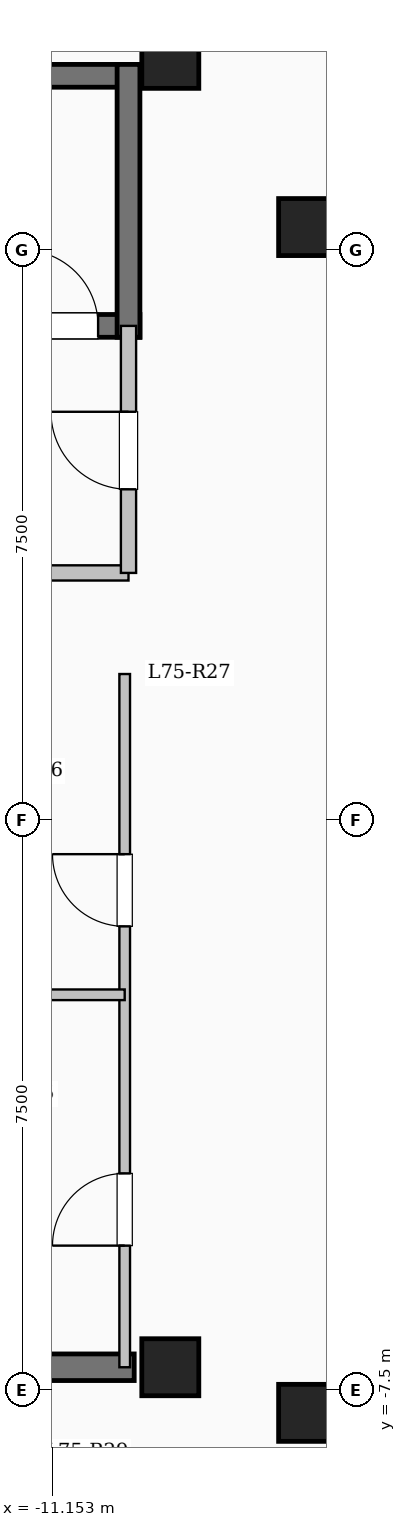
"""IFC4 building model, lengths in metres.
Left out: names, types, materials, properties, quantities, classifications, styles, units other than length and angle.
Written with IfcOpenShell. Run it as: python <this file> out.ifc"""

import sys

from ifc_helpers import new_model, si_unit, direction, frame, frame_2d, origin, origin_2d, place, context, subcontext, project, spatial, rectangle, extrude, element, fill, save


model = new_model("IFC4")
c1 = context("Model", 3, precision=1e-05, world=origin(), true_north=direction((0.0, 1.0)))
c2 = subcontext(c1, "Body", "Model", "MODEL_VIEW")
j1 = project(units=[si_unit("LENGTHUNIT", "METRE"), si_unit("PLANEANGLEUNIT", "RADIAN")], contexts=[c1])
p1 = place(None, origin())
s1 = spatial("IfcSite", under=j1, at=p1, CompositionType="ELEMENT")
p2 = place(p1, origin())
s2 = spatial("IfcBuilding", under=s1, at=p2, CompositionType="ELEMENT")
p3 = place(p2, frame((0.0, 0.0, 276.3)))
s3 = spatial("IfcBuildingStorey", under=s2, at=p3, CompositionType="ELEMENT", Elevation=276.3)
for number, where, z_axis, x_axis in (
    (1, (-7.8, -7.8, 0.0), (0.0, 0.0, 1.0), (1.0, 0.0, 0.0)),
    (2, (-7.8, 7.8, 0.0), (0.0, 0.0, 1.0), (1.0, 0.0, 0.0)),
    (3, (-9.6, -7.2, 0.0), (0.0, 0.0, 1.0), (1.0, 0.0, 0.0)),
    (4, (-9.6, 10.0, 0.0), (0.0, 0.0, 1.0), (1.0, 0.0, 0.0)),
):
    element("IfcColumn", number, at=place(p3, frame(where, z_axis=z_axis, x_axis=x_axis)), inside=s3, PredefinedType="COLUMN", context=c2, shape_type="SweptSolid", body=[
        extrude(rectangle(XDim=0.75, YDim=0.75, at=origin_2d()), origin(), (0.0, 0.0, 1.0), 5.25),
    ])
p4 = place(p3, frame((-18.0, 9.79, 0.0), z_axis=(0.0, 0.0, 1.0), x_axis=(1.0, 0.0, 0.0)))
e5 = element("IfcWall", 5, at=p4, inside=s3, PredefinedType="SHEAR", context=c2, shape_type="SweptSolid", body=[
    extrude(rectangle(XDim=8.0, YDim=0.3, at=frame_2d((4.0, 0.0))), origin(), (0.0, 0.0, 1.0), 5.25),
])
p5 = place(p3, frame((-18.0, 6.5, 0.0), z_axis=(0.0, 0.0, 1.0), x_axis=(1.0, 0.0, 0.0)))
e6 = element("IfcWall", 6, at=p5, inside=s3, PredefinedType="SHEAR", context=c2, shape_type="SweptSolid", body=[
    extrude(rectangle(XDim=8.0, YDim=0.3, at=frame_2d((4.0, 0.0))), origin(), (0.0, 0.0, 1.0), 5.25),
])
p6 = place(p5, frame((6.45, 0.0, 0.0)))
e7 = element("IfcOpeningElement", 7, at=p6, cuts=e6, PredefinedType="OPENING", context=c2, shape_type="SweptSolid", body=[
    extrude(rectangle(XDim=1.0, YDim=2.15, at=frame_2d((0.5, 1.075))), frame((0.0, 0.16, 0.0), z_axis=(0.0, -1.0, 0.0), x_axis=(1.0, 0.0, 0.0)), (0.0, 0.0, 1.0), 0.32),
])
p7 = place(p3, frame((-10.15, 6.35, 0.0), z_axis=(0.0, 0.0, 1.0), x_axis=(0.0, 1.0, 0.0)))
e8 = element("IfcWall", 8, at=p7, inside=s3, PredefinedType="SHEAR", context=c2, shape_type="SweptSolid", body=[
    extrude(rectangle(XDim=3.59, YDim=0.3, at=frame_2d((1.795, 0.0))), origin(), (0.0, 0.0, 1.0), 5.25),
])
p8 = place(p3, frame((-15.55, 3.25, 0.0), z_axis=(0.0, 0.0, 1.0), x_axis=(1.0, 0.0, 0.0)))
e9 = element("IfcWall", 9, at=p8, inside=s3, PredefinedType="SOLIDWALL", context=c2, shape_type="SweptSolid", body=[
    extrude(rectangle(XDim=5.4, YDim=0.2, at=frame_2d((2.7, 0.0))), origin(), (0.0, 0.0, 1.0), 4.95),
])
p9 = place(p3, frame((-10.15, 3.25, 0.0), z_axis=(0.0, 0.0, 1.0), x_axis=(0.0, 1.0, 0.0)))
e10 = element("IfcWall", 10, at=p9, inside=s3, PredefinedType="SOLIDWALL", context=c2, shape_type="SweptSolid", body=[
    extrude(rectangle(XDim=3.25, YDim=0.2, at=frame_2d((1.625, 0.0))), origin(), (0.0, 0.0, 1.0), 4.95),
])
p10 = place(p9, frame((1.1, 0.0, 0.0)))
e11 = element("IfcOpeningElement", 11, at=p10, cuts=e10, PredefinedType="OPENING", context=c2, shape_type="SweptSolid", body=[
    extrude(rectangle(XDim=1.02, YDim=2.15, at=frame_2d((0.51, 1.075))), frame((0.0, 0.11, 0.0), z_axis=(0.0, -1.0, 0.0), x_axis=(1.0, 0.0, 0.0)), (0.0, 0.0, 1.0), 0.22),
])
p11 = place(p3, frame((-18.625, -7.2, 0.0), z_axis=(0.0, 0.0, 1.0), x_axis=(1.0, 0.0, 0.0)))
e12 = element("IfcWall", 12, at=p11, inside=s3, PredefinedType="SHEAR", context=c2, shape_type="SweptSolid", body=[
    extrude(rectangle(XDim=8.55, YDim=0.35, at=frame_2d((4.275, 0.0))), origin(), (0.0, 0.0, 1.0), 5.25),
])
p12 = place(p11, frame((1.725, 0.0, 0.0)))
e13 = element("IfcOpeningElement", 13, at=p12, cuts=e12, PredefinedType="OPENING", context=c2, shape_type="SweptSolid", body=[
    extrude(rectangle(XDim=1.12, YDim=2.15, at=frame_2d((0.56, 1.075))), frame((0.0, 0.185, 0.0), z_axis=(0.0, -1.0, 0.0), x_axis=(1.0, 0.0, 0.0)), (0.0, 0.0, 1.0), 0.37),
])
p13 = place(p3, frame((-10.2, -7.2, 0.0), z_axis=(0.0, 0.0, 1.0), x_axis=(0.0, 1.0, 0.0)))
e14 = element("IfcWall", 14, at=p13, inside=s3, PredefinedType="PARTITIONING", context=c2, shape_type="SweptSolid", body=[
    extrude(rectangle(XDim=9.12, YDim=0.14, at=frame_2d((4.56, 0.0))), origin(), (0.0, 0.0, 1.0), 4.95),
])
p14 = place(p13, frame((1.6, 0.0, 0.0)))
e15 = element("IfcOpeningElement", 15, at=p14, cuts=e14, PredefinedType="OPENING", context=c2, shape_type="SweptSolid", body=[
    extrude(rectangle(XDim=0.95, YDim=2.12, at=frame_2d((0.475, 1.06))), frame((0.0, 0.08, 0.0), z_axis=(0.0, -1.0, 0.0), x_axis=(1.0, 0.0, 0.0)), (0.0, 0.0, 1.0), 0.16),
])
p15 = place(p13, frame((5.8, 0.0, 0.0)))
e16 = element("IfcOpeningElement", 16, at=p15, cuts=e14, PredefinedType="OPENING", context=c2, shape_type="SweptSolid", body=[
    extrude(rectangle(XDim=0.95, YDim=2.12, at=frame_2d((0.475, 1.06))), frame((0.0, 0.08, 0.0), z_axis=(0.0, -1.0, 0.0), x_axis=(1.0, 0.0, 0.0)), (0.0, 0.0, 1.0), 0.16),
])
p16 = place(p3, frame((-12.9, -2.3, 0.0), z_axis=(0.0, 0.0, 1.0), x_axis=(1.0, 0.0, 0.0)))
e17 = element("IfcWall", 17, at=p16, inside=s3, PredefinedType="PARTITIONING", context=c2, shape_type="SweptSolid", body=[
    extrude(rectangle(XDim=2.7, YDim=0.14, at=frame_2d((1.35, 0.0))), origin(), (0.0, 0.0, 1.0), 4.95),
])
p17 = place(p6, origin())
e18 = element("IfcDoor", 18, at=p17, inside=s3, OperationType="SINGLE_SWING_LEFT", PredefinedType="DOOR", context=c2, shape_type="SweptSolid", body=[
    extrude(rectangle(XDim=1.0, YDim=2.15, at=frame_2d((0.5, 1.075))), frame((0.0, 0.025, 0.0), z_axis=(0.0, -1.0, 0.0), x_axis=(1.0, 0.0, 0.0)), (0.0, 0.0, 1.0), 0.05),
])
fill(e7, e18)
p18 = place(p10, origin())
e19 = element("IfcDoor", 19, at=p18, inside=s3, OperationType="SINGLE_SWING_RIGHT", PredefinedType="DOOR", context=c2, shape_type="SweptSolid", body=[
    extrude(rectangle(XDim=1.02, YDim=2.15, at=frame_2d((0.51, 1.075))), frame((0.0, 0.025, 0.0), z_axis=(0.0, -1.0, 0.0), x_axis=(1.0, 0.0, 0.0)), (0.0, 0.0, 1.0), 0.05),
])
fill(e11, e19)
p19 = place(p14, origin())
e20 = element("IfcDoor", 20, at=p19, inside=s3, OperationType="SINGLE_SWING_LEFT", PredefinedType="DOOR", context=c2, shape_type="SweptSolid", body=[
    extrude(rectangle(XDim=0.95, YDim=2.12, at=frame_2d((0.475, 1.06))), frame((0.0, 0.025, 0.0), z_axis=(0.0, -1.0, 0.0), x_axis=(1.0, 0.0, 0.0)), (0.0, 0.0, 1.0), 0.05),
])
fill(e15, e20)
p20 = place(p15, origin())
e21 = element("IfcDoor", 21, at=p20, inside=s3, OperationType="SINGLE_SWING_RIGHT", PredefinedType="DOOR", context=c2, shape_type="SweptSolid", body=[
    extrude(rectangle(XDim=0.95, YDim=2.12, at=frame_2d((0.475, 1.06))), frame((0.0, 0.025, 0.0), z_axis=(0.0, -1.0, 0.0), x_axis=(1.0, 0.0, 0.0)), (0.0, 0.0, 1.0), 0.05),
])
fill(e16, e21)
save(model, sys.argv[1])
